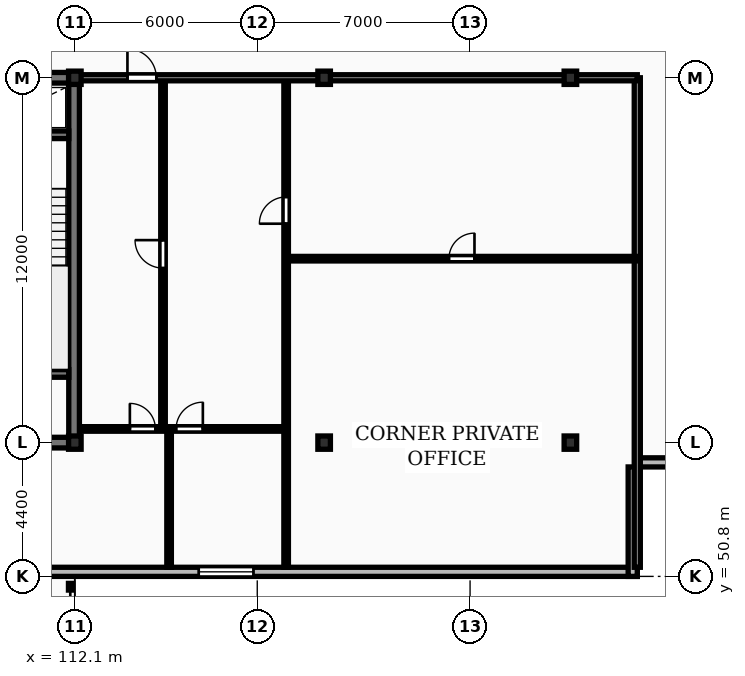
"""IFC4 building model, lengths in metres.
Left out: names, types, materials, properties, quantities, classifications, styles, units other than length and angle.
Written with IfcOpenShell. Run it as: python <this file> out.ifc"""

import sys

from ifc_helpers import new_model, si_unit, direction, frame, frame_2d, origin, origin_2d, place, context, subcontext, project, spatial, rectangle, i_section, extrude, element, fill, save


model = new_model("IFC4")
c1 = context("Model", 3, precision=1e-05, world=origin(), true_north=direction((0.0, 1.0)))
c2 = subcontext(c1, "Body", "Model", "MODEL_VIEW")
j1 = project(units=[si_unit("LENGTHUNIT", "METRE"), si_unit("PLANEANGLEUNIT", "RADIAN")], contexts=[c1])
p1 = place(None, origin())
s1 = spatial("IfcSite", under=j1, at=p1, CompositionType="ELEMENT")
p2 = place(p1, origin())
s2 = spatial("IfcBuilding", under=s1, at=p2, CompositionType="ELEMENT")
p3 = place(p2, frame((0.0, 0.0, 150.1)))
s3 = spatial("IfcBuildingStorey", under=s2, at=p3, CompositionType="ELEMENT", Elevation=150.1)
for number, where, z_axis, x_axis in (
    (1, (112.1, 55.2, 0.0), (0.0, 0.0, 1.0), (1.0, 0.0, 0.0)),
    (2, (112.1, 67.2, 0.0), (0.0, 0.0, 1.0), (1.0, 0.0, 0.0)),
    (3, (120.3, 55.2, 0.0), (0.0, 0.0, 1.0), (1.0, 0.0, 0.0)),
    (4, (120.3, 67.2, 0.0), (0.0, 0.0, 1.0), (1.0, 0.0, 0.0)),
    (5, (128.4, 55.2, 0.0), (0.0, 0.0, 1.0), (1.0, 0.0, 0.0)),
    (6, (128.4, 67.2, 0.0), (0.0, 0.0, 1.0), (1.0, 0.0, 0.0)),
):
    element("IfcColumn", number, at=place(p3, frame(where, z_axis=z_axis, x_axis=x_axis)), inside=s3, PredefinedType="COLUMN", context=c2, shape_type="SweptSolid", body=[
        extrude(i_section(OverallWidth=0.412, OverallDepth=0.437, WebThickness=0.036, FlangeThickness=0.052, FilletRadius=0.015, at=origin_2d()), origin(), (0.0, 0.0, 1.0), 3.6),
    ])
p4 = place(p3, frame((57.6, 50.95, 0.0), z_axis=(0.0, 0.0, 1.0), x_axis=(1.0, 0.0, 0.0)))
e7 = element("IfcWall", 7, at=p4, inside=s3, PredefinedType="STANDARD", context=c2, shape_type="SweptSolid", body=[
    extrude(rectangle(XDim=73.0, YDim=0.3, at=frame_2d((36.5, 0.0))), origin(), (0.0, 0.0, 1.0), 3.31),
])
p5 = place(p4, frame((15.225, 0.0, 0.85)))
e8 = element("IfcOpeningElement", 8, at=p5, cuts=e7, PredefinedType="OPENING", context=c2, shape_type="SweptSolid", body=[
    extrude(rectangle(XDim=1.8, YDim=1.8, at=frame_2d((0.9, 0.9))), frame((0.0, 0.16, 0.0), z_axis=(0.0, -1.0, 0.0), x_axis=(1.0, 0.0, 0.0)), (0.0, 0.0, 1.0), 0.32),
])
p6 = place(p4, frame((58.575, 0.0, 0.85)))
e9 = element("IfcOpeningElement", 9, at=p6, cuts=e7, PredefinedType="OPENING", context=c2, shape_type="SweptSolid", body=[
    extrude(rectangle(XDim=1.8, YDim=1.8, at=frame_2d((0.9, 0.9))), frame((0.0, 0.16, 0.0), z_axis=(0.0, -1.0, 0.0), x_axis=(1.0, 0.0, 0.0)), (0.0, 0.0, 1.0), 0.32),
])
p7 = place(p4, frame((33.45, 0.0, 0.0)))
e10 = element("IfcOpeningElement", 10, at=p7, cuts=e7, PredefinedType="OPENING", context=c2, shape_type="SweptSolid", body=[
    extrude(rectangle(XDim=1.1, YDim=2.1, at=frame_2d((0.55, 1.05))), frame((0.0, 0.16, 0.0), z_axis=(0.0, -1.0, 0.0), x_axis=(1.0, 0.0, 0.0)), (0.0, 0.0, 1.0), 0.32),
])
for number, where, z_axis, x_axis in (
    (11, (130.45, 50.8, 0.0), (0.0, 0.0, 1.0), (0.0, 1.0, 0.0)),
    (12, (130.6, 54.55, 0.0), (0.0, 0.0, 1.0), (1.0, 0.0, 0.0)),
):
    element("IfcWall", number, at=place(p3, frame(where, z_axis=z_axis, x_axis=x_axis)), inside=s3, PredefinedType="STANDARD", context=c2, shape_type="SweptSolid", body=[
        extrude(rectangle(XDim=3.6, YDim=0.3, at=frame_2d((1.8, 0.0))), origin(), (0.0, 0.0, 1.0), 3.31),
    ])
p8 = place(p3, frame((75.95, 55.2, 0.0), z_axis=(0.0, 0.0, 1.0), x_axis=(1.0, 0.0, 0.0)))
e13 = element("IfcWall", 13, at=p8, inside=s3, PredefinedType="SHEAR", context=c2, shape_type="SweptSolid", body=[
    extrude(rectangle(XDim=36.3, YDim=0.35, at=frame_2d((18.15, 0.0))), origin(), (0.0, 0.0, 1.0), 3.6),
])
p9 = place(p8, frame((15.1, 0.0, 0.0)))
e14 = element("IfcOpeningElement", 14, at=p9, cuts=e13, PredefinedType="OPENING", context=c2, shape_type="SweptSolid", body=[
    extrude(rectangle(XDim=1.1, YDim=2.1, at=frame_2d((0.55, 1.05))), frame((0.0, 0.185, 0.0), z_axis=(0.0, -1.0, 0.0), x_axis=(1.0, 0.0, 0.0)), (0.0, 0.0, 1.0), 0.37),
])
p10 = place(p3, frame((112.075, 55.375, 0.0), z_axis=(0.0, 0.0, 1.0), x_axis=(0.0, 1.0, 0.0)))
e15 = element("IfcWall", 15, at=p10, inside=s3, PredefinedType="SHEAR", context=c2, shape_type="SweptSolid", body=[
    extrude(rectangle(XDim=11.65, YDim=0.35, at=frame_2d((5.825, 0.0))), origin(), (0.0, 0.0, 1.0), 3.6),
])
p11 = place(p3, frame((75.95, 67.2, 0.0), z_axis=(0.0, 0.0, 1.0), x_axis=(1.0, 0.0, 0.0)))
e16 = element("IfcWall", 16, at=p11, inside=s3, PredefinedType="SHEAR", context=c2, shape_type="SweptSolid", body=[
    extrude(rectangle(XDim=36.3, YDim=0.35, at=frame_2d((18.15, 0.0))), origin(), (0.0, 0.0, 1.0), 3.6),
])
p12 = place(p11, frame((5.25, 0.0, 0.0)))
e17 = element("IfcOpeningElement", 17, at=p12, cuts=e16, PredefinedType="OPENING", context=c2, shape_type="SweptSolid", body=[
    extrude(rectangle(XDim=1.0, YDim=2.15, at=frame_2d((0.5, 1.075))), frame((0.0, 0.185, 0.0), z_axis=(0.0, -1.0, 0.0), x_axis=(1.0, 0.0, 0.0)), (0.0, 0.0, 1.0), 0.37),
])
p13 = place(p11, frame((21.6, 0.0, 0.0)))
e18 = element("IfcOpeningElement", 18, at=p13, cuts=e16, PredefinedType="OPENING", context=c2, shape_type="SweptSolid", body=[
    extrude(rectangle(XDim=1.5, YDim=2.2, at=frame_2d((0.75, 1.1))), frame((0.0, 0.185, 0.0), z_axis=(0.0, -1.0, 0.0), x_axis=(1.0, 0.0, 0.0)), (0.0, 0.0, 1.0), 0.37),
])
p14 = place(p11, frame((30.45, 0.0, 0.0)))
e19 = element("IfcOpeningElement", 19, at=p14, cuts=e16, PredefinedType="OPENING", context=c2, shape_type="SweptSolid", body=[
    extrude(rectangle(XDim=1.0, YDim=2.15, at=frame_2d((0.5, 1.075))), frame((0.0, 0.185, 0.0), z_axis=(0.0, -1.0, 0.0), x_axis=(1.0, 0.0, 0.0)), (0.0, 0.0, 1.0), 0.37),
])
for number, where, z_axis, x_axis in (
    (20, (108.66, 57.475, 0.0), (0.0, 0.0, 1.0), (1.0, 0.0, 0.0)),
    (21, (108.66, 65.325, 0.0), (0.0, 0.0, 1.0), (1.0, 0.0, 0.0)),
):
    element("IfcWall", number, at=place(p3, frame(where, z_axis=z_axis, x_axis=x_axis)), inside=s3, PredefinedType="SHEAR", context=c2, shape_type="SweptSolid", body=[
        extrude(rectangle(XDim=3.24, YDim=0.25, at=frame_2d((1.62, 0.0))), origin(), (0.0, 0.0, 1.0), 3.6),
    ])
p15 = place(p3, frame((130.6, 51.1, 0.0), z_axis=(0.0, 0.0, 1.0), x_axis=(0.0, 1.0, 0.0)))
e22 = element("IfcWall", 22, at=p15, inside=s3, PredefinedType="PARTITIONING", context=c2, shape_type="SweptSolid", body=[
    extrude(rectangle(XDim=16.1, YDim=0.2, at=frame_2d((8.05, 0.0))), origin(), (0.0, 0.0, 1.0), 3.31),
])
p16 = place(p3, frame((119.05, 61.25, 0.0), z_axis=(0.0, 0.0, 1.0), x_axis=(1.0, 0.0, 0.0)))
e23 = element("IfcWall", 23, at=p16, inside=s3, PredefinedType="PARTITIONING", context=c2, shape_type="SweptSolid", body=[
    extrude(rectangle(XDim=11.55, YDim=0.15, at=frame_2d((5.775, 0.0))), origin(), (0.0, 0.0, 1.0), 3.31),
])
p17 = place(p16, frame((5.355, 0.0, 0.0)))
e24 = element("IfcOpeningElement", 24, at=p17, cuts=e23, PredefinedType="OPENING", context=c2, shape_type="SweptSolid", body=[
    extrude(rectangle(XDim=0.84, YDim=2.04, at=frame_2d((0.42, 1.02))), frame((0.0, 0.085, 0.0), z_axis=(0.0, -1.0, 0.0), x_axis=(1.0, 0.0, 0.0)), (0.0, 0.0, 1.0), 0.17),
])
p18 = place(p3, frame((119.05, 51.1, 0.0), z_axis=(0.0, 0.0, 1.0), x_axis=(0.0, 1.0, 0.0)))
e25 = element("IfcWall", 25, at=p18, inside=s3, PredefinedType="PARTITIONING", context=c2, shape_type="SweptSolid", body=[
    extrude(rectangle(XDim=16.05, YDim=0.15, at=frame_2d((8.025, 0.0))), origin(), (0.0, 0.0, 1.0), 3.31),
])
p19 = place(p18, frame((11.3, 0.0, 0.0)))
e26 = element("IfcOpeningElement", 26, at=p19, cuts=e25, PredefinedType="OPENING", context=c2, shape_type="SweptSolid", body=[
    extrude(rectangle(XDim=0.88, YDim=2.06, at=frame_2d((0.44, 1.03))), frame((0.0, 0.085, 0.0), z_axis=(0.0, -1.0, 0.0), x_axis=(1.0, 0.0, 0.0)), (0.0, 0.0, 1.0), 0.17),
])
p20 = place(p3, frame((115.0, 55.65, 0.0), z_axis=(0.0, 0.0, 1.0), x_axis=(0.0, 1.0, 0.0)))
e27 = element("IfcWall", 27, at=p20, inside=s3, PredefinedType="PARTITIONING", context=c2, shape_type="SweptSolid", body=[
    extrude(rectangle(XDim=11.5, YDim=0.15, at=frame_2d((5.75, 0.0))), origin(), (0.0, 0.0, 1.0), 3.31),
])
p21 = place(p20, frame((5.29, 0.0, 0.0)))
e28 = element("IfcOpeningElement", 28, at=p21, cuts=e27, PredefinedType="OPENING", context=c2, shape_type="SweptSolid", body=[
    extrude(rectangle(XDim=0.92, YDim=2.08, at=frame_2d((0.46, 1.04))), frame((0.0, 0.085, 0.0), z_axis=(0.0, -1.0, 0.0), x_axis=(1.0, 0.0, 0.0)), (0.0, 0.0, 1.0), 0.17),
])
p22 = place(p3, frame((115.2, 51.1, 0.0), z_axis=(0.0, 0.0, 1.0), x_axis=(0.0, 1.0, 0.0)))
e29 = element("IfcWall", 29, at=p22, inside=s3, PredefinedType="PARTITIONING", context=c2, shape_type="SweptSolid", body=[
    extrude(rectangle(XDim=4.55, YDim=0.15, at=frame_2d((2.275, 0.0))), origin(), (0.0, 0.0, 1.0), 3.31),
])
p23 = place(p3, frame((112.27, 55.65, 0.0), z_axis=(0.0, 0.0, 1.0), x_axis=(1.0, 0.0, 0.0)))
e30 = element("IfcWall", 30, at=p23, inside=s3, PredefinedType="PARTITIONING", context=c2, shape_type="SweptSolid", body=[
    extrude(rectangle(XDim=6.76, YDim=0.15, at=frame_2d((3.38, 0.0))), origin(), (0.0, 0.0, 1.0), 3.31),
])
p24 = place(p23, frame((1.64, 0.0, 0.0)))
e31 = element("IfcOpeningElement", 31, at=p24, cuts=e30, PredefinedType="OPENING", context=c2, shape_type="SweptSolid", body=[
    extrude(rectangle(XDim=0.84, YDim=2.04, at=frame_2d((0.42, 1.02))), frame((0.0, 0.085, 0.0), z_axis=(0.0, -1.0, 0.0), x_axis=(1.0, 0.0, 0.0)), (0.0, 0.0, 1.0), 0.17),
])
p25 = place(p23, frame((3.16, 0.0, 0.0)))
e32 = element("IfcOpeningElement", 32, at=p25, cuts=e30, PredefinedType="OPENING", context=c2, shape_type="SweptSolid", body=[
    extrude(rectangle(XDim=0.88, YDim=2.06, at=frame_2d((0.44, 1.03))), frame((0.0, 0.085, 0.0), z_axis=(0.0, -1.0, 0.0), x_axis=(1.0, 0.0, 0.0)), (0.0, 0.0, 1.0), 0.17),
])
p26 = place(p3, frame((112.25, 67.2, 0.0), z_axis=(0.0, 0.0, 1.0), x_axis=(1.0, 0.0, 0.0)))
e33 = element("IfcWall", 33, at=p26, inside=s3, PredefinedType="PARTITIONING", context=c2, shape_type="SweptSolid", body=[
    extrude(rectangle(XDim=18.35, YDim=0.2, at=frame_2d((9.175, 0.0))), origin(), (0.0, 0.0, 1.0), 2.773),
])
p27 = place(p26, frame((1.58, 0.0, 0.0)))
e34 = element("IfcOpeningElement", 34, at=p27, cuts=e33, PredefinedType="OPENING", context=c2, shape_type="SweptSolid", body=[
    extrude(rectangle(XDim=0.95, YDim=2.15, at=frame_2d((0.475, 1.075))), frame((0.0, 0.11, 0.0), z_axis=(0.0, -1.0, 0.0), x_axis=(1.0, 0.0, 0.0)), (0.0, 0.0, 1.0), 0.22),
])
p28 = place(p6, origin())
e35 = element("IfcWindow", 35, at=p28, inside=s3, PartitioningType="SINGLE_PANEL", PredefinedType="WINDOW", context=c2, shape_type="SweptSolid", body=[
    extrude(rectangle(XDim=1.8, YDim=1.8, at=frame_2d((0.9, 0.9))), frame((0.0, 0.03, 0.0), z_axis=(0.0, -1.0, 0.0), x_axis=(1.0, 0.0, 0.0)), (0.0, 0.0, 1.0), 0.06),
])
fill(e9, e35)
p29 = place(p17, origin())
e36 = element("IfcDoor", 36, at=p29, inside=s3, OperationType="SINGLE_SWING_RIGHT", PredefinedType="DOOR", context=c2, shape_type="SweptSolid", body=[
    extrude(rectangle(XDim=0.84, YDim=2.04, at=frame_2d((0.42, 1.02))), frame((0.0, 0.025, 0.0), z_axis=(0.0, -1.0, 0.0), x_axis=(1.0, 0.0, 0.0)), (0.0, 0.0, 1.0), 0.05),
])
fill(e24, e36)
p30 = place(p19, origin())
e37 = element("IfcDoor", 37, at=p30, inside=s3, OperationType="SINGLE_SWING_LEFT", PredefinedType="DOOR", context=c2, shape_type="SweptSolid", body=[
    extrude(rectangle(XDim=0.88, YDim=2.06, at=frame_2d((0.44, 1.03))), frame((0.0, 0.025, 0.0), z_axis=(0.0, -1.0, 0.0), x_axis=(1.0, 0.0, 0.0)), (0.0, 0.0, 1.0), 0.05),
])
fill(e26, e37)
p31 = place(p21, origin())
e38 = element("IfcDoor", 38, at=p31, inside=s3, OperationType="SINGLE_SWING_RIGHT", PredefinedType="DOOR", context=c2, shape_type="SweptSolid", body=[
    extrude(rectangle(XDim=0.92, YDim=2.08, at=frame_2d((0.46, 1.04))), frame((0.0, 0.025, 0.0), z_axis=(0.0, -1.0, 0.0), x_axis=(1.0, 0.0, 0.0)), (0.0, 0.0, 1.0), 0.05),
])
fill(e28, e38)
p32 = place(p24, origin())
e39 = element("IfcDoor", 39, at=p32, inside=s3, OperationType="SINGLE_SWING_LEFT", PredefinedType="DOOR", context=c2, shape_type="SweptSolid", body=[
    extrude(rectangle(XDim=0.84, YDim=2.04, at=frame_2d((0.42, 1.02))), frame((0.0, 0.025, 0.0), z_axis=(0.0, -1.0, 0.0), x_axis=(1.0, 0.0, 0.0)), (0.0, 0.0, 1.0), 0.05),
])
fill(e31, e39)
p33 = place(p25, origin())
e40 = element("IfcDoor", 40, at=p33, inside=s3, OperationType="SINGLE_SWING_RIGHT", PredefinedType="DOOR", context=c2, shape_type="SweptSolid", body=[
    extrude(rectangle(XDim=0.88, YDim=2.06, at=frame_2d((0.44, 1.03))), frame((0.0, 0.025, 0.0), z_axis=(0.0, -1.0, 0.0), x_axis=(1.0, 0.0, 0.0)), (0.0, 0.0, 1.0), 0.05),
])
fill(e32, e40)
p34 = place(p27, origin())
e41 = element("IfcDoor", 41, at=p34, inside=s3, OperationType="SINGLE_SWING_LEFT", PredefinedType="DOOR", context=c2, shape_type="SweptSolid", body=[
    extrude(rectangle(XDim=0.95, YDim=2.15, at=frame_2d((0.475, 1.075))), frame((0.0, 0.025, 0.0), z_axis=(0.0, -1.0, 0.0), x_axis=(1.0, 0.0, 0.0)), (0.0, 0.0, 1.0), 0.05),
])
fill(e34, e41)
save(model, sys.argv[1])
